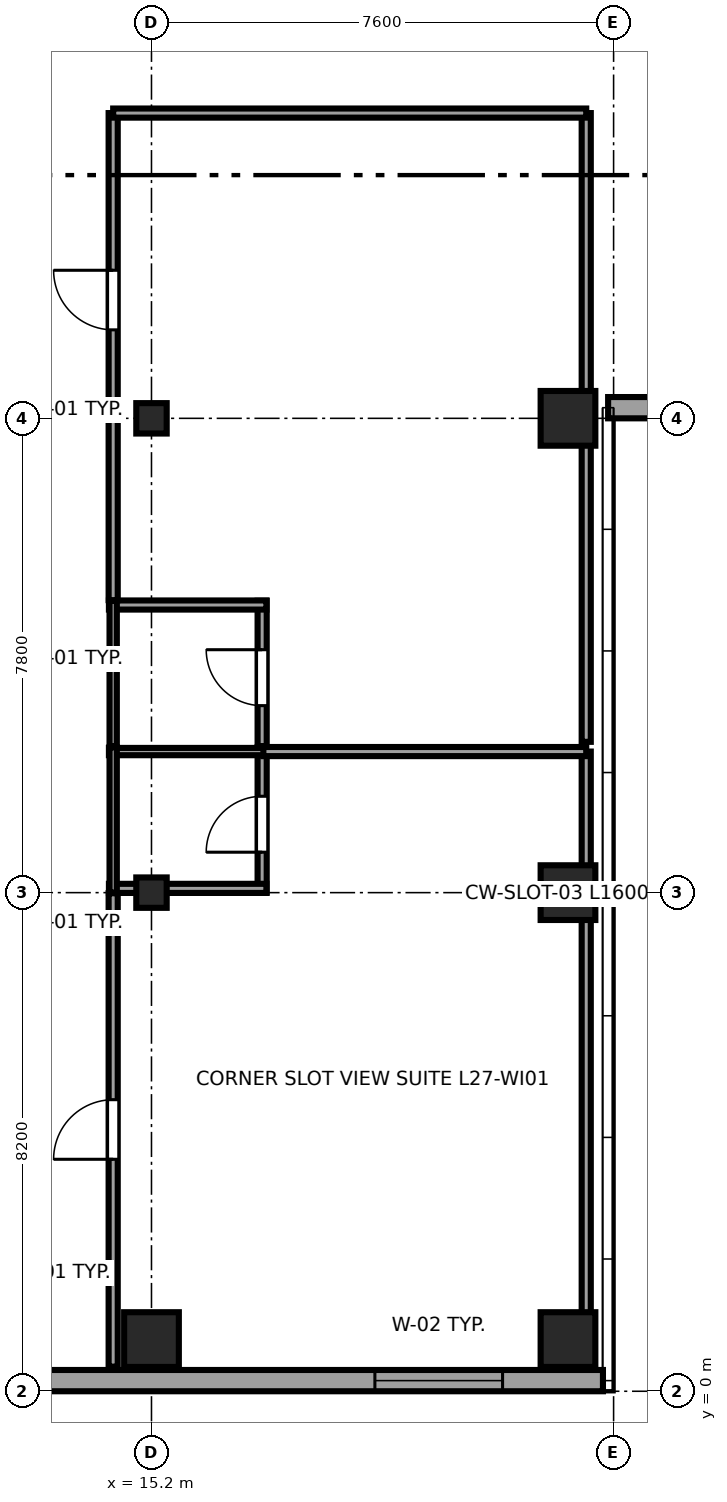
"""IFC4 building model, lengths in metres.
Left out: names, types, materials, properties, quantities, classifications, styles, units other than length and angle.
Written with IfcOpenShell. Run it as: python <this file> out.ifc"""

import sys

from ifc_helpers import new_model, si_unit, direction, frame, frame_2d, origin, origin_2d, place, context, subcontext, project, spatial, rectangle, i_section, extrude, source, transform, mapped, element, fill, save


model = new_model("IFC4")
c1 = context("Model", 3, precision=1e-05, world=origin(), true_north=direction((0.0, 1.0)))
c2 = subcontext(c1, "Body", "Model", "MODEL_VIEW")
j1 = project(units=[si_unit("LENGTHUNIT", "METRE"), si_unit("PLANEANGLEUNIT", "RADIAN")], contexts=[c1])
p1 = place(None, origin())
s1 = spatial("IfcSite", under=j1, at=p1, CompositionType="ELEMENT")
p2 = place(p1, origin())
s2 = spatial("IfcBuilding", under=s1, at=p2, CompositionType="ELEMENT")
p3 = place(p2, frame((0.0, 0.0, 108.0)))
s3 = spatial("IfcBuildingStorey", under=s2, at=p3, CompositionType="ELEMENT", Elevation=108.0)
m1 = source(origin(), c2, "Body", "SweptSolid", [
    extrude(rectangle(XDim=0.9, YDim=0.9, at=origin_2d()), origin(), (0.0, 0.0, 1.0), 3.55),
])
p4 = place(p3, frame((15.2, 0.85, 0.0), z_axis=(0.0, 0.0, 1.0), x_axis=(1.0, 0.0, 0.0)))
e1 = element("IfcColumn", 1, at=p4, inside=s3, PredefinedType="COLUMN", context=c2, shape_type="MappedRepresentation", body=[
    mapped(m1, transform((0.0, 0.0, 0.0), x_axis=(1.0, 0.0, 0.0), y_axis=(0.0, 1.0, 0.0), z_axis=(0.0, 0.0, 1.0), scale=1.0)),
])
m2 = source(origin(), c2, "Body", "SweptSolid", [
    extrude(i_section(OverallWidth=0.5, OverallDepth=0.5, WebThickness=0.022, FlangeThickness=0.034, at=origin_2d()), origin(), (0.0, 0.0, 1.0), 3.55),
])
for number, where, z_axis, x_axis in (
    (2, (15.2, 8.2, 0.0), (0.0, 0.0, 1.0), (1.0, 0.0, 0.0)),
    (3, (15.2, 16.0, 0.0), (0.0, 0.0, 1.0), (1.0, 0.0, 0.0)),
):
    element("IfcColumn", number, at=place(p3, frame(where, z_axis=z_axis, x_axis=x_axis)), inside=s3, PredefinedType="COLUMN", context=c2, shape_type="MappedRepresentation", body=[
        mapped(m2, transform((0.0, 0.0, 0.0), x_axis=(1.0, 0.0, 0.0), y_axis=(0.0, 1.0, 0.0), z_axis=(0.0, 0.0, 1.0), scale=1.0)),
    ])
for number, where, z_axis, x_axis in (
    (4, (22.05, 0.85, 0.0), (0.0, 0.0, 1.0), (1.0, 0.0, 0.0)),
    (5, (22.05, 8.2, 0.0), (0.0, 0.0, 1.0), (1.0, 0.0, 0.0)),
    (6, (22.05, 16.0, 0.0), (0.0, 0.0, 1.0), (1.0, 0.0, 0.0)),
):
    element("IfcColumn", number, at=place(p3, frame(where, z_axis=z_axis, x_axis=x_axis)), inside=s3, PredefinedType="COLUMN", context=c2, shape_type="MappedRepresentation", body=[
        mapped(m1, transform((0.0, 0.0, 0.0), x_axis=(1.0, 0.0, 0.0), y_axis=(0.0, 1.0, 0.0), z_axis=(0.0, 0.0, 1.0), scale=1.0)),
    ])
p5 = place(p3, frame((4.617, 0.175, 0.0), z_axis=(0.0, 0.0, 1.0), x_axis=(1.0, 0.0, 0.0)))
e7 = element("IfcWall", 7, at=p5, inside=s3, PredefinedType="SOLIDWALL", context=c2, shape_type="SweptSolid", body=[
    extrude(rectangle(XDim=18.008, YDim=0.35, at=frame_2d((9.004, 0.0))), origin(), (0.0, 0.0, 1.0), 3.37),
])
p6 = place(p5, frame((5.303, 0.0, 0.68)))
e8 = element("IfcOpeningElement", 8, at=p6, cuts=e7, PredefinedType="OPENING", context=c2, shape_type="SweptSolid", body=[
    extrude(rectangle(XDim=2.1, YDim=1.9, at=frame_2d((1.05, 0.95))), frame((0.0, 0.185, 0.0), z_axis=(0.0, -1.0, 0.0), x_axis=(1.0, 0.0, 0.0)), (0.0, 0.0, 1.0), 0.37),
])
p7 = place(p5, frame((14.257, 0.0, 0.68)))
e9 = element("IfcOpeningElement", 9, at=p7, cuts=e7, PredefinedType="OPENING", context=c2, shape_type="SweptSolid", body=[
    extrude(rectangle(XDim=2.1, YDim=1.9, at=frame_2d((1.05, 0.95))), frame((0.0, 0.185, 0.0), z_axis=(0.0, -1.0, 0.0), x_axis=(1.0, 0.0, 0.0)), (0.0, 0.0, 1.0), 0.37),
])
p8 = place(p3, frame((22.71, 16.175, 0.0), z_axis=(0.0, 0.0, 1.0), x_axis=(1.0, 0.0, 0.0)))
e10 = element("IfcWall", 10, at=p8, inside=s3, PredefinedType="SOLIDWALL", context=c2, shape_type="SweptSolid", body=[
    extrude(rectangle(XDim=11.58, YDim=0.35, at=frame_2d((5.79, 0.0))), origin(), (0.0, 0.0, 1.0), 2.748),
])
p9 = place(p8, frame((2.145, 0.0, 0.68)))
e11 = element("IfcOpeningElement", 11, at=p9, cuts=e10, PredefinedType="OPENING", context=c2, shape_type="SweptSolid", body=[
    extrude(rectangle(XDim=2.1, YDim=1.9, at=frame_2d((1.05, 0.95))), frame((0.0, 0.185, 0.0), z_axis=(0.0, -1.0, 0.0), x_axis=(1.0, 0.0, 0.0)), (0.0, 0.0, 1.0), 0.37),
])
p10 = place(p8, frame((7.335, 0.0, 0.68)))
e12 = element("IfcOpeningElement", 12, at=p10, cuts=e10, PredefinedType="OPENING", context=c2, shape_type="SweptSolid", body=[
    extrude(rectangle(XDim=2.1, YDim=1.9, at=frame_2d((1.05, 0.95))), frame((0.0, 0.185, 0.0), z_axis=(0.0, -1.0, 0.0), x_axis=(1.0, 0.0, 0.0)), (0.0, 0.0, 1.0), 0.37),
])
p11 = place(p3, frame((17.02, 8.2, 0.0), z_axis=(0.0, 0.0, 1.0), x_axis=(0.0, 1.0, 0.0)))
e13 = element("IfcWall", 13, at=p11, inside=s3, PredefinedType="PARTITIONING", context=c2, shape_type="SweptSolid", body=[
    extrude(rectangle(XDim=2.39, YDim=0.15, at=frame_2d((1.195, 0.0))), origin(), (0.0, 0.0, 1.0), 3.37),
])
p12 = place(p11, frame((0.665, 0.0, 0.0)))
e14 = element("IfcOpeningElement", 14, at=p12, cuts=e13, PredefinedType="OPENING", context=c2, shape_type="SweptSolid", body=[
    extrude(rectangle(XDim=0.92, YDim=2.01, at=frame_2d((0.46, 1.005))), frame((0.0, 0.085, 0.0), z_axis=(0.0, -1.0, 0.0), x_axis=(1.0, 0.0, 0.0)), (0.0, 0.0, 1.0), 0.17),
])
p13 = place(p3, frame((14.5, 8.27, 0.0), z_axis=(0.0, 0.0, 1.0), x_axis=(1.0, 0.0, 0.0)))
e15 = element("IfcWall", 15, at=p13, inside=s3, PredefinedType="PARTITIONING", context=c2, shape_type="SweptSolid", body=[
    extrude(rectangle(XDim=2.59, YDim=0.15, at=frame_2d((1.295, 0.0))), origin(), (0.0, 0.0, 1.0), 2.748),
])
p14 = place(p3, frame((14.5, 10.52, 0.0), z_axis=(0.0, 0.0, 1.0), x_axis=(1.0, 0.0, 0.0)))
e16 = element("IfcWall", 16, at=p14, inside=s3, PredefinedType="PLUMBINGWALL", context=c2, shape_type="SweptSolid", body=[
    extrude(rectangle(XDim=2.59, YDim=0.12, at=frame_2d((1.295, 0.0))), origin(), (0.0, 0.0, 1.0), 3.37),
])
p15 = place(p3, frame((14.57, 8.2, 0.0), z_axis=(0.0, 0.0, 1.0), x_axis=(0.0, 1.0, 0.0)))
e17 = element("IfcWall", 17, at=p15, inside=s3, PredefinedType="PLUMBINGWALL", context=c2, shape_type="SweptSolid", body=[
    extrude(rectangle(XDim=2.39, YDim=0.12, at=frame_2d((1.195, 0.0))), origin(), (0.0, 0.0, 1.0), 3.37),
])
p16 = place(p3, frame((17.02, 10.61, 0.0), z_axis=(0.0, 0.0, 1.0), x_axis=(0.0, 1.0, 0.0)))
e18 = element("IfcWall", 18, at=p16, inside=s3, PredefinedType="PARTITIONING", context=c2, shape_type="SweptSolid", body=[
    extrude(rectangle(XDim=2.39, YDim=0.15, at=frame_2d((1.195, 0.0))), origin(), (0.0, 0.0, 1.0), 3.37),
])
p17 = place(p16, frame((0.665, 0.0, 0.0)))
e19 = element("IfcOpeningElement", 19, at=p17, cuts=e18, PredefinedType="OPENING", context=c2, shape_type="SweptSolid", body=[
    extrude(rectangle(XDim=0.92, YDim=2.01, at=frame_2d((0.46, 1.005))), frame((0.0, 0.085, 0.0), z_axis=(0.0, -1.0, 0.0), x_axis=(1.0, 0.0, 0.0)), (0.0, 0.0, 1.0), 0.17),
])
p18 = place(p3, frame((14.5, 12.93, 0.0), z_axis=(0.0, 0.0, 1.0), x_axis=(1.0, 0.0, 0.0)))
e20 = element("IfcWall", 20, at=p18, inside=s3, PredefinedType="PARTITIONING", context=c2, shape_type="SweptSolid", body=[
    extrude(rectangle(XDim=2.59, YDim=0.15, at=frame_2d((1.295, 0.0))), origin(), (0.0, 0.0, 1.0), 3.37),
])
p19 = place(p3, frame((14.57, 10.61, 0.0), z_axis=(0.0, 0.0, 1.0), x_axis=(0.0, 1.0, 0.0)))
e21 = element("IfcWall", 21, at=p19, inside=s3, PredefinedType="PLUMBINGWALL", context=c2, shape_type="SweptSolid", body=[
    extrude(rectangle(XDim=2.39, YDim=0.12, at=frame_2d((1.195, 0.0))), origin(), (0.0, 0.0, 1.0), 3.37),
])
p20 = place(p3, frame((14.57, 0.405, 0.0), z_axis=(0.0, 0.0, 1.0), x_axis=(0.0, 1.0, 0.0)))
e22 = element("IfcWall", 22, at=p20, inside=s3, PredefinedType="PARTITIONING", context=c2, shape_type="SweptSolid", body=[
    extrude(rectangle(XDim=7.785, YDim=0.15, at=frame_2d((3.893, 0.0))), origin(), (0.0, 0.0, 1.0), 3.37),
])
p21 = place(p20, frame((3.41, 0.0, 0.0)))
e23 = element("IfcOpeningElement", 23, at=p21, cuts=e22, PredefinedType="OPENING", context=c2, shape_type="SweptSolid", body=[
    extrude(rectangle(XDim=0.98, YDim=2.12, at=frame_2d((0.49, 1.06))), frame((0.0, 0.085, 0.0), z_axis=(0.0, -1.0, 0.0), x_axis=(1.0, 0.0, 0.0)), (0.0, 0.0, 1.0), 0.17),
])
p22 = place(p3, frame((22.35, 0.405, 0.0), z_axis=(0.0, 0.0, 1.0), x_axis=(0.0, 1.0, 0.0)))
e24 = element("IfcWall", 24, at=p22, inside=s3, PredefinedType="PARTITIONING", context=c2, shape_type="SweptSolid", body=[
    extrude(rectangle(XDim=10.115, YDim=0.15, at=frame_2d((5.058, 0.0))), origin(), (0.0, 0.0, 1.0), 3.37),
])
p23 = place(p3, frame((17.04, 10.52, 0.0), z_axis=(0.0, 0.0, 1.0), x_axis=(1.0, 0.0, 0.0)))
e25 = element("IfcWall", 25, at=p23, inside=s3, PredefinedType="PARTITIONING", context=c2, shape_type="SweptSolid", body=[
    extrude(rectangle(XDim=5.31, YDim=0.15, at=frame_2d((2.655, 0.0))), origin(), (0.0, 0.0, 1.0), 3.37),
])
p24 = place(p3, frame((14.57, 13.01, 0.0), z_axis=(0.0, 0.0, 1.0), x_axis=(0.0, 1.0, 0.0)))
e26 = element("IfcWall", 26, at=p24, inside=s3, PredefinedType="PARTITIONING", context=c2, shape_type="SweptSolid", body=[
    extrude(rectangle(XDim=8.01, YDim=0.15, at=frame_2d((4.005, 0.0))), origin(), (0.0, 0.0, 1.0), 3.37),
])
p25 = place(p24, frame((4.445, 0.0, 0.0)))
e27 = element("IfcOpeningElement", 27, at=p25, cuts=e26, PredefinedType="OPENING", context=c2, shape_type="SweptSolid", body=[
    extrude(rectangle(XDim=0.98, YDim=2.12, at=frame_2d((0.49, 1.06))), frame((0.0, 0.085, 0.0), z_axis=(0.0, -1.0, 0.0), x_axis=(1.0, 0.0, 0.0)), (0.0, 0.0, 1.0), 0.17),
])
p26 = place(p3, frame((22.35, 10.68, 0.0), z_axis=(0.0, 0.0, 1.0), x_axis=(0.0, 1.0, 0.0)))
e28 = element("IfcWall", 28, at=p26, inside=s3, PredefinedType="PARTITIONING", context=c2, shape_type="SweptSolid", body=[
    extrude(rectangle(XDim=10.34, YDim=0.15, at=frame_2d((5.17, 0.0))), origin(), (0.0, 0.0, 1.0), 3.37),
])
p27 = place(p3, frame((14.57, 21.02, 0.0), z_axis=(0.0, 0.0, 1.0), x_axis=(1.0, 0.0, 0.0)))
e29 = element("IfcWall", 29, at=p27, inside=s3, PredefinedType="PARTITIONING", context=c2, shape_type="SweptSolid", body=[
    extrude(rectangle(XDim=7.78, YDim=0.15, at=frame_2d((3.89, 0.0))), origin(), (0.0, 0.0, 1.0), 3.37),
])
m3 = source(origin(), c2, "Body", "SweptSolid", [
    extrude(rectangle(XDim=2.1, YDim=1.9, at=frame_2d((1.05, 0.95))), frame((0.0, 0.09, 0.0), z_axis=(0.0, -1.0, 0.0), x_axis=(1.0, 0.0, 0.0)), (0.0, 0.0, 1.0), 0.06),
])
p28 = place(p7, origin())
e30 = element("IfcWindow", 30, at=p28, inside=s3, PartitioningType="TRIPLE_PANEL_HORIZONTAL", PredefinedType="WINDOW", context=c2, shape_type="MappedRepresentation", body=[
    mapped(m3, transform((0.0, 0.0, 0.0), x_axis=(1.0, 0.0, 0.0), y_axis=(0.0, 1.0, 0.0), z_axis=(0.0, 0.0, 1.0), scale=1.0)),
])
fill(e9, e30)
m4 = source(origin(), c2, "Body", "SweptSolid", [
    extrude(rectangle(XDim=0.92, YDim=2.01, at=frame_2d((0.46, 1.005))), frame((0.0, 0.025, 0.0), z_axis=(0.0, -1.0, 0.0), x_axis=(1.0, 0.0, 0.0)), (0.0, 0.0, 1.0), 0.05),
])
p29 = place(p12, origin())
e31 = element("IfcDoor", 31, at=p29, inside=s3, OperationType="SINGLE_SWING_LEFT", PredefinedType="DOOR", context=c2, shape_type="MappedRepresentation", body=[
    mapped(m4, transform((0.0, 0.0, 0.0), x_axis=(1.0, 0.0, 0.0), y_axis=(0.0, 1.0, 0.0), z_axis=(0.0, 0.0, 1.0), scale=1.0)),
])
fill(e14, e31)
p30 = place(p17, origin())
e32 = element("IfcDoor", 32, at=p30, inside=s3, OperationType="SINGLE_SWING_RIGHT", PredefinedType="DOOR", context=c2, shape_type="MappedRepresentation", body=[
    mapped(m4, transform((0.0, 0.0, 0.0), x_axis=(1.0, 0.0, 0.0), y_axis=(0.0, 1.0, 0.0), z_axis=(0.0, 0.0, 1.0), scale=1.0)),
])
fill(e19, e32)
m5 = source(origin(), c2, "Body", "SweptSolid", [
    extrude(rectangle(XDim=0.98, YDim=2.12, at=frame_2d((0.49, 1.06))), frame((0.0, 0.025, 0.0), z_axis=(0.0, -1.0, 0.0), x_axis=(1.0, 0.0, 0.0)), (0.0, 0.0, 1.0), 0.05),
])
p31 = place(p21, origin())
e33 = element("IfcDoor", 33, at=p31, inside=s3, OperationType="SINGLE_SWING_LEFT", PredefinedType="DOOR", context=c2, shape_type="MappedRepresentation", body=[
    mapped(m5, transform((0.0, 0.0, 0.0), x_axis=(1.0, 0.0, 0.0), y_axis=(0.0, 1.0, 0.0), z_axis=(0.0, 0.0, 1.0), scale=1.0)),
])
fill(e23, e33)
p32 = place(p25, origin())
e34 = element("IfcDoor", 34, at=p32, inside=s3, OperationType="SINGLE_SWING_RIGHT", PredefinedType="DOOR", context=c2, shape_type="MappedRepresentation", body=[
    mapped(m5, transform((0.0, 0.0, 0.0), x_axis=(1.0, 0.0, 0.0), y_axis=(0.0, 1.0, 0.0), z_axis=(0.0, 0.0, 1.0), scale=1.0)),
])
fill(e27, e34)
save(model, sys.argv[1])
